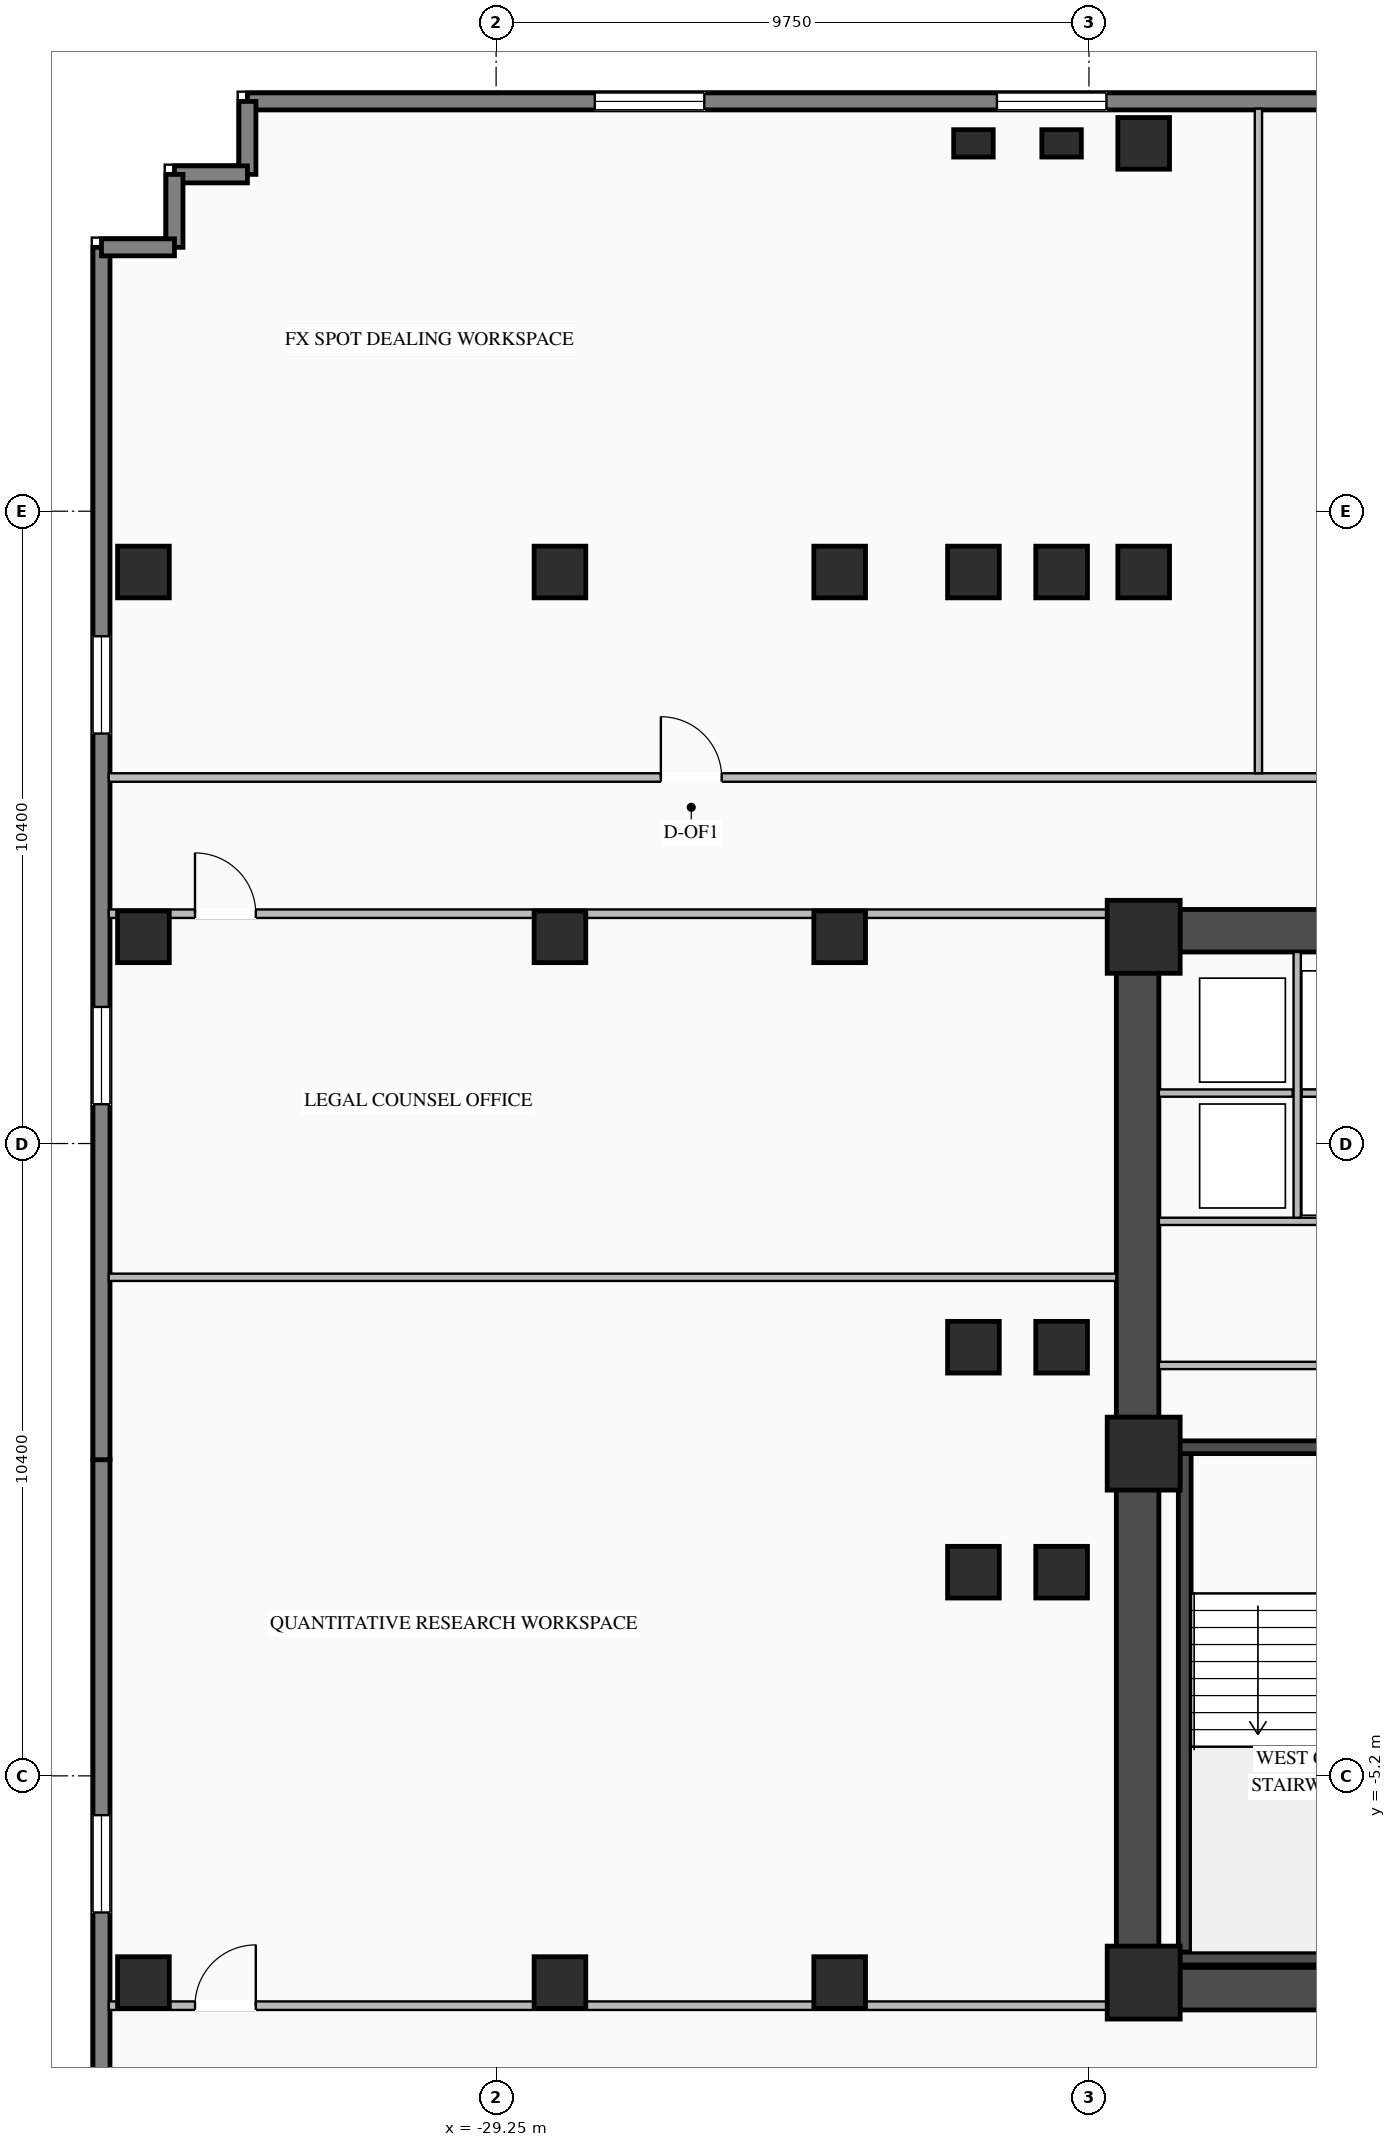
"""IFC4 building model, lengths in metres.
Left out: names, types, materials, properties, quantities, classifications, styles, units other than length and angle.
Written with IfcOpenShell. Run it as: python <this file> out.ifc"""

import sys

from ifc_helpers import new_model, si_unit, direction, frame, frame_2d, origin, origin_2d, place, context, subcontext, project, spatial, rectangle, i_section, extrude, element, fill, save


model = new_model("IFC4")
c1 = context("Model", 3, precision=1e-05, world=origin(), true_north=direction((0.0, 1.0)))
c2 = subcontext(c1, "Body", "Model", "MODEL_VIEW")
j1 = project(units=[si_unit("LENGTHUNIT", "METRE"), si_unit("PLANEANGLEUNIT", "RADIAN")], contexts=[c1])
p1 = place(None, origin())
s1 = spatial("IfcSite", under=j1, at=p1, CompositionType="ELEMENT")
p2 = place(p1, origin())
s2 = spatial("IfcBuilding", under=s1, at=p2, CompositionType="ELEMENT")
p3 = place(p2, frame((0.0, 0.0, 31.2)))
s3 = spatial("IfcBuildingStorey", under=s2, at=p3, CompositionType="ELEMENT", Elevation=31.2)
p4 = place(p3, frame((-19.05, -8.7, 0.0), z_axis=(0.0, 0.0, 1.0), x_axis=(1.0, 0.0, 0.0)))
e1 = element("IfcWall", 1, at=p4, inside=s3, PredefinedType="SHEAR", context=c2, shape_type="SweptSolid", body=[
    extrude(rectangle(XDim=10.25, YDim=0.7, at=frame_2d((5.125, 0.0))), origin(), (0.0, 0.0, 1.0), 3.27),
])
p5 = place(p3, frame((-19.05, 8.7, 0.0), z_axis=(0.0, 0.0, 1.0), x_axis=(1.0, 0.0, 0.0)))
e2 = element("IfcWall", 2, at=p5, inside=s3, PredefinedType="SHEAR", context=c2, shape_type="SweptSolid", body=[
    extrude(rectangle(XDim=10.25, YDim=0.7, at=frame_2d((5.125, 0.0))), origin(), (0.0, 0.0, 1.0), 3.27),
])
p6 = place(p5, frame((5.6, 0.0, 0.0)))
e3 = element("IfcOpeningElement", 3, at=p6, cuts=e2, PredefinedType="OPENING", context=c2, shape_type="SweptSolid", body=[
    extrude(rectangle(XDim=1.4, YDim=2.05, at=frame_2d((0.7, 1.025))), frame((0.0, 0.36, 0.0), z_axis=(0.0, -1.0, 0.0), x_axis=(1.0, 0.0, 0.0)), (0.0, 0.0, 1.0), 0.72),
])
p7 = place(p3, frame((-18.7, -8.35, 0.0), z_axis=(0.0, 0.0, 1.0), x_axis=(0.0, 1.0, 0.0)))
e4 = element("IfcWall", 4, at=p7, inside=s3, PredefinedType="SHEAR", context=c2, shape_type="SweptSolid", body=[
    extrude(rectangle(XDim=16.7, YDim=0.7, at=frame_2d((8.35, 0.0))), origin(), (0.0, 0.0, 1.0), 3.27),
])
p8 = place(p3, frame((-17.925, -8.1, 0.0), z_axis=(0.0, 0.0, 1.0), x_axis=(0.0, 1.0, 0.0)))
e5 = element("IfcWall", 5, at=p8, inside=s3, PredefinedType="SHEAR", context=c2, shape_type="SweptSolid", body=[
    extrude(rectangle(XDim=8.2, YDim=0.21, at=frame_2d((4.1, 0.0))), origin(), (0.0, 0.0, 1.0), 3.27),
])
for number, where, z_axis, x_axis in (
    (6, (-18.03, -8.205, 0.0), (0.0, 0.0, 1.0), (1.0, 0.0, 0.0)),
    (7, (-12.89, 0.205, 0.0), (0.0, 0.0, 1.0), (-1.0, 0.0, 0.0)),
):
    element("IfcWall", number, at=place(p3, frame(where, z_axis=z_axis, x_axis=x_axis)), inside=s3, PredefinedType="SHEAR", context=c2, shape_type="SweptSolid", body=[
        extrude(rectangle(XDim=5.14, YDim=0.21, at=frame_2d((2.57, 0.0))), origin(), (0.0, 0.0, 1.0), 3.27),
    ])
for number, where, z_axis, x_axis in (
    (8, (-18.6, -8.6, 0.0), (0.0, 0.0, 1.0), (1.0, 0.0, 0.0)),
    (9, (-18.6, 0.1, 0.0), (0.0, 0.0, 1.0), (1.0, 0.0, 0.0)),
    (10, (-18.6, 8.6, 0.0), (0.0, 0.0, 1.0), (1.0, 0.0, 0.0)),
):
    element("IfcColumn", number, at=place(p3, frame(where, z_axis=z_axis, x_axis=x_axis)), inside=s3, PredefinedType="COLUMN", context=c2, shape_type="SweptSolid", body=[
        extrude(rectangle(XDim=1.2, YDim=1.2, at=origin_2d()), origin(), (0.0, 0.0, 1.0), 3.45),
    ])
for number, where, z_axis, x_axis in (
    (11, (-21.4, 14.6, 0.0), (0.0, 0.0, 1.0), (1.0, 0.0, 0.0)),
    (12, (-19.95, 14.6, 0.0), (0.0, 0.0, 1.0), (1.0, 0.0, 0.0)),
    (13, (-18.6, 14.6, 0.0), (0.0, 0.0, 1.0), (1.0, 0.0, 0.0)),
    (14, (-21.4, -1.85, 0.0), (0.0, 0.0, 1.0), (1.0, 0.0, 0.0)),
    (15, (-21.4, 1.85, 0.0), (0.0, 0.0, 1.0), (1.0, 0.0, 0.0)),
    (16, (-19.95, -1.85, 0.0), (0.0, 0.0, 1.0), (1.0, 0.0, 0.0)),
    (17, (-19.95, 1.85, 0.0), (0.0, 0.0, 1.0), (1.0, 0.0, 0.0)),
    (18, (-23.6, -8.6, 0.0), (0.0, 0.0, 1.0), (1.0, 0.0, 0.0)),
    (19, (-23.6, 8.6, 0.0), (0.0, 0.0, 1.0), (1.0, 0.0, 0.0)),
    (20, (-23.6, 14.6, 0.0), (0.0, 0.0, 1.0), (1.0, 0.0, 0.0)),
    (21, (-28.2, -8.6, 0.0), (0.0, 0.0, 1.0), (1.0, 0.0, 0.0)),
    (22, (-28.2, 8.6, 0.0), (0.0, 0.0, 1.0), (1.0, 0.0, 0.0)),
    (23, (-28.2, 14.6, 0.0), (0.0, 0.0, 1.0), (1.0, 0.0, 0.0)),
    (24, (-18.6, 21.65, 0.0), (0.0, 0.0, 1.0), (1.0, 0.0, 0.0)),
    (25, (-35.05, -8.6, 0.0), (0.0, 0.0, 1.0), (1.0, 0.0, 0.0)),
    (26, (-35.05, 8.6, 0.0), (0.0, 0.0, 1.0), (1.0, 0.0, 0.0)),
    (27, (-35.05, 14.6, 0.0), (0.0, 0.0, 1.0), (1.0, 0.0, 0.0)),
):
    element("IfcColumn", number, at=place(p3, frame(where, z_axis=z_axis, x_axis=x_axis)), inside=s3, PredefinedType="COLUMN", context=c2, shape_type="SweptSolid", body=[
        extrude(i_section(OverallWidth=0.85, OverallDepth=0.85, WebThickness=0.032, FlangeThickness=0.048, at=origin_2d()), origin(), (0.0, 0.0, 1.0), 3.45),
    ])
for number, where, z_axis, x_axis in (
    (28, (-21.4, 21.65, 0.0), (0.0, 0.0, 1.0), (1.0, 0.0, 0.0)),
    (29, (-19.95, 21.65, 0.0), (0.0, 0.0, 1.0), (1.0, 0.0, 0.0)),
):
    element("IfcColumn", number, at=place(p3, frame(where, z_axis=z_axis, x_axis=x_axis)), inside=s3, PredefinedType="PILASTER", context=c2, shape_type="SweptSolid", body=[
        extrude(rectangle(XDim=0.65, YDim=0.45, at=origin_2d()), origin(), (0.0, 0.0, 1.0), 3.45),
    ])
p9 = place(p3, frame((-33.34, 22.34, 0.0), z_axis=(0.0, 0.0, 1.0), x_axis=(1.0, 0.0, 0.0)))
e30 = element("IfcWall", 30, at=p9, inside=s3, PredefinedType="STANDARD", context=c2, shape_type="SweptSolid", body=[
    extrude(rectangle(XDim=19.84, YDim=0.28, at=frame_2d((9.92, 0.0))), origin(), (0.0, 0.0, 1.0), 3.25),
])
p10 = place(p9, frame((5.713, 0.0, 0.76)))
e31 = element("IfcOpeningElement", 31, at=p10, cuts=e30, PredefinedType="OPENING", context=c2, shape_type="SweptSolid", body=[
    extrude(rectangle(XDim=1.8, YDim=1.95, at=frame_2d((0.9, 0.975))), frame((0.0, 0.15, 0.0), z_axis=(0.0, -1.0, 0.0), x_axis=(1.0, 0.0, 0.0)), (0.0, 0.0, 1.0), 0.3),
])
p11 = place(p9, frame((12.327, 0.0, 0.76)))
e32 = element("IfcOpeningElement", 32, at=p11, cuts=e30, PredefinedType="OPENING", context=c2, shape_type="SweptSolid", body=[
    extrude(rectangle(XDim=1.8, YDim=1.95, at=frame_2d((0.9, 0.975))), frame((0.0, 0.15, 0.0), z_axis=(0.0, -1.0, 0.0), x_axis=(1.0, 0.0, 0.0)), (0.0, 0.0, 1.0), 0.3),
])
p12 = place(p3, frame((-35.74, -19.94, 0.0), z_axis=(0.0, 0.0, 1.0), x_axis=(0.0, 1.0, 0.0)))
e33 = element("IfcWall", 33, at=p12, inside=s3, PredefinedType="STANDARD", context=c2, shape_type="SweptSolid", body=[
    extrude(rectangle(XDim=19.94, YDim=0.28, at=frame_2d((9.97, 0.0))), origin(), (0.0, 0.0, 1.0), 3.25),
])
p13 = place(p12, frame((6.397, 0.0, 0.76)))
e34 = element("IfcOpeningElement", 34, at=p13, cuts=e33, PredefinedType="OPENING", context=c2, shape_type="SweptSolid", body=[
    extrude(rectangle(XDim=1.6, YDim=1.95, at=frame_2d((0.8, 0.975))), frame((0.0, 0.15, 0.0), z_axis=(0.0, -1.0, 0.0), x_axis=(1.0, 0.0, 0.0)), (0.0, 0.0, 1.0), 0.3),
])
p14 = place(p12, frame((12.493, 0.0, 0.76)))
e35 = element("IfcOpeningElement", 35, at=p14, cuts=e33, PredefinedType="OPENING", context=c2, shape_type="SweptSolid", body=[
    extrude(rectangle(XDim=1.6, YDim=1.95, at=frame_2d((0.8, 0.975))), frame((0.0, 0.15, 0.0), z_axis=(0.0, -1.0, 0.0), x_axis=(1.0, 0.0, 0.0)), (0.0, 0.0, 1.0), 0.3),
])
p15 = place(p3, frame((-35.74, 0.0, 0.0), z_axis=(0.0, 0.0, 1.0), x_axis=(0.0, 1.0, 0.0)))
e36 = element("IfcWall", 36, at=p15, inside=s3, PredefinedType="STANDARD", context=c2, shape_type="SweptSolid", body=[
    extrude(rectangle(XDim=19.94, YDim=0.28, at=frame_2d((9.97, 0.0))), origin(), (0.0, 0.0, 1.0), 3.25),
])
p16 = place(p15, frame((5.847, 0.0, 0.76)))
e37 = element("IfcOpeningElement", 37, at=p16, cuts=e36, PredefinedType="OPENING", context=c2, shape_type="SweptSolid", body=[
    extrude(rectangle(XDim=1.6, YDim=1.95, at=frame_2d((0.8, 0.975))), frame((0.0, 0.15, 0.0), z_axis=(0.0, -1.0, 0.0), x_axis=(1.0, 0.0, 0.0)), (0.0, 0.0, 1.0), 0.3),
])
p17 = place(p15, frame((11.943, 0.0, 0.76)))
e38 = element("IfcOpeningElement", 38, at=p17, cuts=e36, PredefinedType="OPENING", context=c2, shape_type="SweptSolid", body=[
    extrude(rectangle(XDim=1.6, YDim=1.95, at=frame_2d((0.8, 0.975))), frame((0.0, 0.15, 0.0), z_axis=(0.0, -1.0, 0.0), x_axis=(1.0, 0.0, 0.0)), (0.0, 0.0, 1.0), 0.3),
])
p18 = place(p3, frame((-33.34, 22.34, 0.0), z_axis=(0.0, 0.0, 1.0), x_axis=(0.0, -1.0, 0.0)))
e39 = element("IfcWall", 39, at=p18, inside=s3, PredefinedType="STANDARD", context=c2, shape_type="SweptSolid", body=[
    extrude(rectangle(XDim=1.2, YDim=0.28, at=frame_2d((0.6, 0.0))), origin(), (0.0, 0.0, 1.0), 3.25),
])
for number, where, z_axis, x_axis in (
    (40, (-33.34, 21.14, 0.0), (0.0, 0.0, 1.0), (-1.0, 0.0, 0.0)),
    (41, (-34.54, 21.14, 0.0), (0.0, 0.0, 1.0), (0.0, -1.0, 0.0)),
    (42, (-34.54, 19.94, 0.0), (0.0, 0.0, 1.0), (-1.0, 0.0, 0.0)),
):
    element("IfcWall", number, at=place(p3, frame(where, z_axis=z_axis, x_axis=x_axis)), inside=s3, PredefinedType="STANDARD", context=c2, shape_type="SweptSolid", body=[
        extrude(rectangle(XDim=1.2, YDim=0.28, at=frame_2d((0.6, 0.0))), origin(), (0.0, 0.0, 1.0), 3.25),
    ])
p19 = place(p3, frame((-18.35, 3.92, 0.0), z_axis=(0.0, 0.0, 1.0), x_axis=(1.0, 0.0, 0.0)))
e43 = element("IfcWall", 43, at=p19, inside=s3, PredefinedType="STANDARD", context=c2, shape_type="SweptSolid", body=[
    extrude(rectangle(XDim=4.45, YDim=0.12, at=frame_2d((2.225, 0.0))), origin(), (0.0, 0.0, 1.0), 3.25),
])
p20 = place(p3, frame((-18.35, 6.03, 0.0), z_axis=(0.0, 0.0, 1.0), x_axis=(1.0, 0.0, 0.0)))
e44 = element("IfcWall", 44, at=p20, inside=s3, PredefinedType="STANDARD", context=c2, shape_type="SweptSolid", body=[
    extrude(rectangle(XDim=2.2, YDim=0.12, at=frame_2d((1.1, 0.0))), origin(), (0.0, 0.0, 1.0), 3.25),
])
p21 = place(p3, frame((-16.075, 3.98, 0.0), z_axis=(0.0, 0.0, 1.0), x_axis=(0.0, 1.0, 0.0)))
e45 = element("IfcWall", 45, at=p21, inside=s3, PredefinedType="STANDARD", context=c2, shape_type="SweptSolid", body=[
    extrude(rectangle(XDim=4.37, YDim=0.12, at=frame_2d((2.185, 0.0))), origin(), (0.0, 0.0, 1.0), 3.25),
])
p22 = place(p3, frame((-16.0, 6.03, 0.0), z_axis=(0.0, 0.0, 1.0), x_axis=(1.0, 0.0, 0.0)))
e46 = element("IfcWall", 46, at=p22, inside=s3, PredefinedType="STANDARD", context=c2, shape_type="SweptSolid", body=[
    extrude(rectangle(XDim=2.1, YDim=0.12, at=frame_2d((1.05, 0.0))), origin(), (0.0, 0.0, 1.0), 3.25),
])
p23 = place(p3, frame((-18.35, 1.55, 0.0), z_axis=(0.0, 0.0, 1.0), x_axis=(1.0, 0.0, 0.0)))
e47 = element("IfcWall", 47, at=p23, inside=s3, PredefinedType="STANDARD", context=c2, shape_type="SweptSolid", body=[
    extrude(rectangle(XDim=4.45, YDim=0.12, at=frame_2d((2.225, 0.0))), origin(), (0.0, 0.0, 1.0), 3.25),
])
p24 = place(p3, frame((-35.62, 11.22, 0.0), z_axis=(0.0, 0.0, 1.0), x_axis=(1.0, 0.0, 0.0)))
e48 = element("IfcWall", 48, at=p24, inside=s3, PredefinedType="STANDARD", context=c2, shape_type="SweptSolid", body=[
    extrude(rectangle(XDim=71.24, YDim=0.14, at=frame_2d((35.62, 0.0))), origin(), (0.0, 0.0, 1.0), 3.25),
])
p25 = place(p24, frame((9.08, 0.0, 0.0)))
e49 = element("IfcOpeningElement", 49, at=p25, cuts=e48, PredefinedType="OPENING", context=c2, shape_type="SweptSolid", body=[
    extrude(rectangle(XDim=1.0, YDim=2.08, at=frame_2d((0.5, 1.04))), frame((0.0, 0.08, 0.0), z_axis=(0.0, -1.0, 0.0), x_axis=(1.0, 0.0, 0.0)), (0.0, 0.0, 1.0), 0.16),
])
p26 = place(p24, frame((31.919, 0.0, 0.0)))
e50 = element("IfcOpeningElement", 50, at=p26, cuts=e48, PredefinedType="OPENING", context=c2, shape_type="SweptSolid", body=[
    extrude(rectangle(XDim=1.0, YDim=2.08, at=frame_2d((0.5, 1.04))), frame((0.0, 0.08, 0.0), z_axis=(0.0, -1.0, 0.0), x_axis=(1.0, 0.0, 0.0)), (0.0, 0.0, 1.0), 0.16),
])
p27 = place(p24, frame((57.96, 0.0, 0.0)))
e51 = element("IfcOpeningElement", 51, at=p27, cuts=e48, PredefinedType="OPENING", context=c2, shape_type="SweptSolid", body=[
    extrude(rectangle(XDim=1.0, YDim=2.08, at=frame_2d((0.5, 1.04))), frame((0.0, 0.08, 0.0), z_axis=(0.0, -1.0, 0.0), x_axis=(1.0, 0.0, 0.0)), (0.0, 0.0, 1.0), 0.16),
])
p28 = place(p3, frame((-16.713, 11.29, 0.0), z_axis=(0.0, 0.0, 1.0), x_axis=(0.0, 1.0, 0.0)))
e52 = element("IfcWall", 52, at=p28, inside=s3, PredefinedType="STANDARD", context=c2, shape_type="SweptSolid", body=[
    extrude(rectangle(XDim=10.93, YDim=0.12, at=frame_2d((5.465, 0.0))), origin(), (0.0, 0.0, 1.0), 3.25),
])
p29 = place(p3, frame((-35.62, 8.98, 0.0), z_axis=(0.0, 0.0, 1.0), x_axis=(1.0, 0.0, 0.0)))
e53 = element("IfcWall", 53, at=p29, inside=s3, PredefinedType="STANDARD", context=c2, shape_type="SweptSolid", body=[
    extrude(rectangle(XDim=16.57, YDim=0.14, at=frame_2d((8.285, 0.0))), origin(), (0.0, 0.0, 1.0), 3.25),
])
p30 = place(p29, frame((1.418, 0.0, 0.0)))
e54 = element("IfcOpeningElement", 54, at=p30, cuts=e53, PredefinedType="OPENING", context=c2, shape_type="SweptSolid", body=[
    extrude(rectangle(XDim=1.0, YDim=2.08, at=frame_2d((0.5, 1.04))), frame((0.0, 0.08, 0.0), z_axis=(0.0, -1.0, 0.0), x_axis=(1.0, 0.0, 0.0)), (0.0, 0.0, 1.0), 0.16),
])
p31 = place(p3, frame((-35.62, -8.98, 0.0), z_axis=(0.0, 0.0, 1.0), x_axis=(1.0, 0.0, 0.0)))
e55 = element("IfcWall", 55, at=p31, inside=s3, PredefinedType="STANDARD", context=c2, shape_type="SweptSolid", body=[
    extrude(rectangle(XDim=16.57, YDim=0.14, at=frame_2d((8.285, 0.0))), origin(), (0.0, 0.0, 1.0), 3.25),
])
p32 = place(p31, frame((1.418, 0.0, 0.0)))
e56 = element("IfcOpeningElement", 56, at=p32, cuts=e55, PredefinedType="OPENING", context=c2, shape_type="SweptSolid", body=[
    extrude(rectangle(XDim=1.0, YDim=2.08, at=frame_2d((0.5, 1.04))), frame((0.0, 0.08, 0.0), z_axis=(0.0, -1.0, 0.0), x_axis=(1.0, 0.0, 0.0)), (0.0, 0.0, 1.0), 0.16),
])
p33 = place(p3, frame((-35.62, 3.0, 0.0), z_axis=(0.0, 0.0, 1.0), x_axis=(1.0, 0.0, 0.0)))
e57 = element("IfcWall", 57, at=p33, inside=s3, PredefinedType="STANDARD", context=c2, shape_type="SweptSolid", body=[
    extrude(rectangle(XDim=16.57, YDim=0.12, at=frame_2d((8.285, 0.0))), origin(), (0.0, 0.0, 1.0), 3.25),
])
p34 = place(p10, origin())
e58 = element("IfcWindow", 58, at=p34, inside=s3, PartitioningType="SINGLE_PANEL", PredefinedType="WINDOW", context=c2, shape_type="SweptSolid", body=[
    extrude(rectangle(XDim=1.8, YDim=1.95, at=frame_2d((0.9, 0.975))), frame((0.0, 0.03, 0.0), z_axis=(0.0, -1.0, 0.0), x_axis=(1.0, 0.0, 0.0)), (0.0, 0.0, 1.0), 0.06),
])
fill(e31, e58)
p35 = place(p11, origin())
e59 = element("IfcWindow", 59, at=p35, inside=s3, PartitioningType="SINGLE_PANEL", PredefinedType="WINDOW", context=c2, shape_type="SweptSolid", body=[
    extrude(rectangle(XDim=1.8, YDim=1.95, at=frame_2d((0.9, 0.975))), frame((0.0, 0.03, 0.0), z_axis=(0.0, -1.0, 0.0), x_axis=(1.0, 0.0, 0.0)), (0.0, 0.0, 1.0), 0.06),
])
fill(e32, e59)
p36 = place(p14, origin())
e60 = element("IfcWindow", 60, at=p36, inside=s3, PartitioningType="SINGLE_PANEL", PredefinedType="WINDOW", context=c2, shape_type="SweptSolid", body=[
    extrude(rectangle(XDim=1.6, YDim=1.95, at=frame_2d((0.8, 0.975))), frame((0.0, 0.03, 0.0), z_axis=(0.0, -1.0, 0.0), x_axis=(1.0, 0.0, 0.0)), (0.0, 0.0, 1.0), 0.06),
])
fill(e35, e60)
p37 = place(p16, origin())
e61 = element("IfcWindow", 61, at=p37, inside=s3, PartitioningType="SINGLE_PANEL", PredefinedType="WINDOW", context=c2, shape_type="SweptSolid", body=[
    extrude(rectangle(XDim=1.6, YDim=1.95, at=frame_2d((0.8, 0.975))), frame((0.0, 0.03, 0.0), z_axis=(0.0, -1.0, 0.0), x_axis=(1.0, 0.0, 0.0)), (0.0, 0.0, 1.0), 0.06),
])
fill(e37, e61)
p38 = place(p17, origin())
e62 = element("IfcWindow", 62, at=p38, inside=s3, PartitioningType="SINGLE_PANEL", PredefinedType="WINDOW", context=c2, shape_type="SweptSolid", body=[
    extrude(rectangle(XDim=1.6, YDim=1.95, at=frame_2d((0.8, 0.975))), frame((0.0, 0.03, 0.0), z_axis=(0.0, -1.0, 0.0), x_axis=(1.0, 0.0, 0.0)), (0.0, 0.0, 1.0), 0.06),
])
fill(e38, e62)
p39 = place(p25, origin())
e63 = element("IfcDoor", 63, at=p39, inside=s3, OperationType="SINGLE_SWING_LEFT", PredefinedType="DOOR", context=c2, shape_type="SweptSolid", body=[
    extrude(rectangle(XDim=1.0, YDim=2.08, at=frame_2d((0.5, 1.04))), frame((0.0, 0.025, 0.0), z_axis=(0.0, -1.0, 0.0), x_axis=(1.0, 0.0, 0.0)), (0.0, 0.0, 1.0), 0.05),
])
fill(e49, e63)
p40 = place(p30, origin())
e64 = element("IfcDoor", 64, at=p40, inside=s3, OperationType="SINGLE_SWING_LEFT", PredefinedType="DOOR", context=c2, shape_type="SweptSolid", body=[
    extrude(rectangle(XDim=1.0, YDim=2.08, at=frame_2d((0.5, 1.04))), frame((0.0, 0.025, 0.0), z_axis=(0.0, -1.0, 0.0), x_axis=(1.0, 0.0, 0.0)), (0.0, 0.0, 1.0), 0.05),
])
fill(e54, e64)
p41 = place(p32, origin())
e65 = element("IfcDoor", 65, at=p41, inside=s3, OperationType="SINGLE_SWING_RIGHT", PredefinedType="DOOR", context=c2, shape_type="SweptSolid", body=[
    extrude(rectangle(XDim=1.0, YDim=2.08, at=frame_2d((0.5, 1.04))), frame((0.0, 0.025, 0.0), z_axis=(0.0, -1.0, 0.0), x_axis=(1.0, 0.0, 0.0)), (0.0, 0.0, 1.0), 0.05),
])
fill(e56, e65)
save(model, sys.argv[1])
